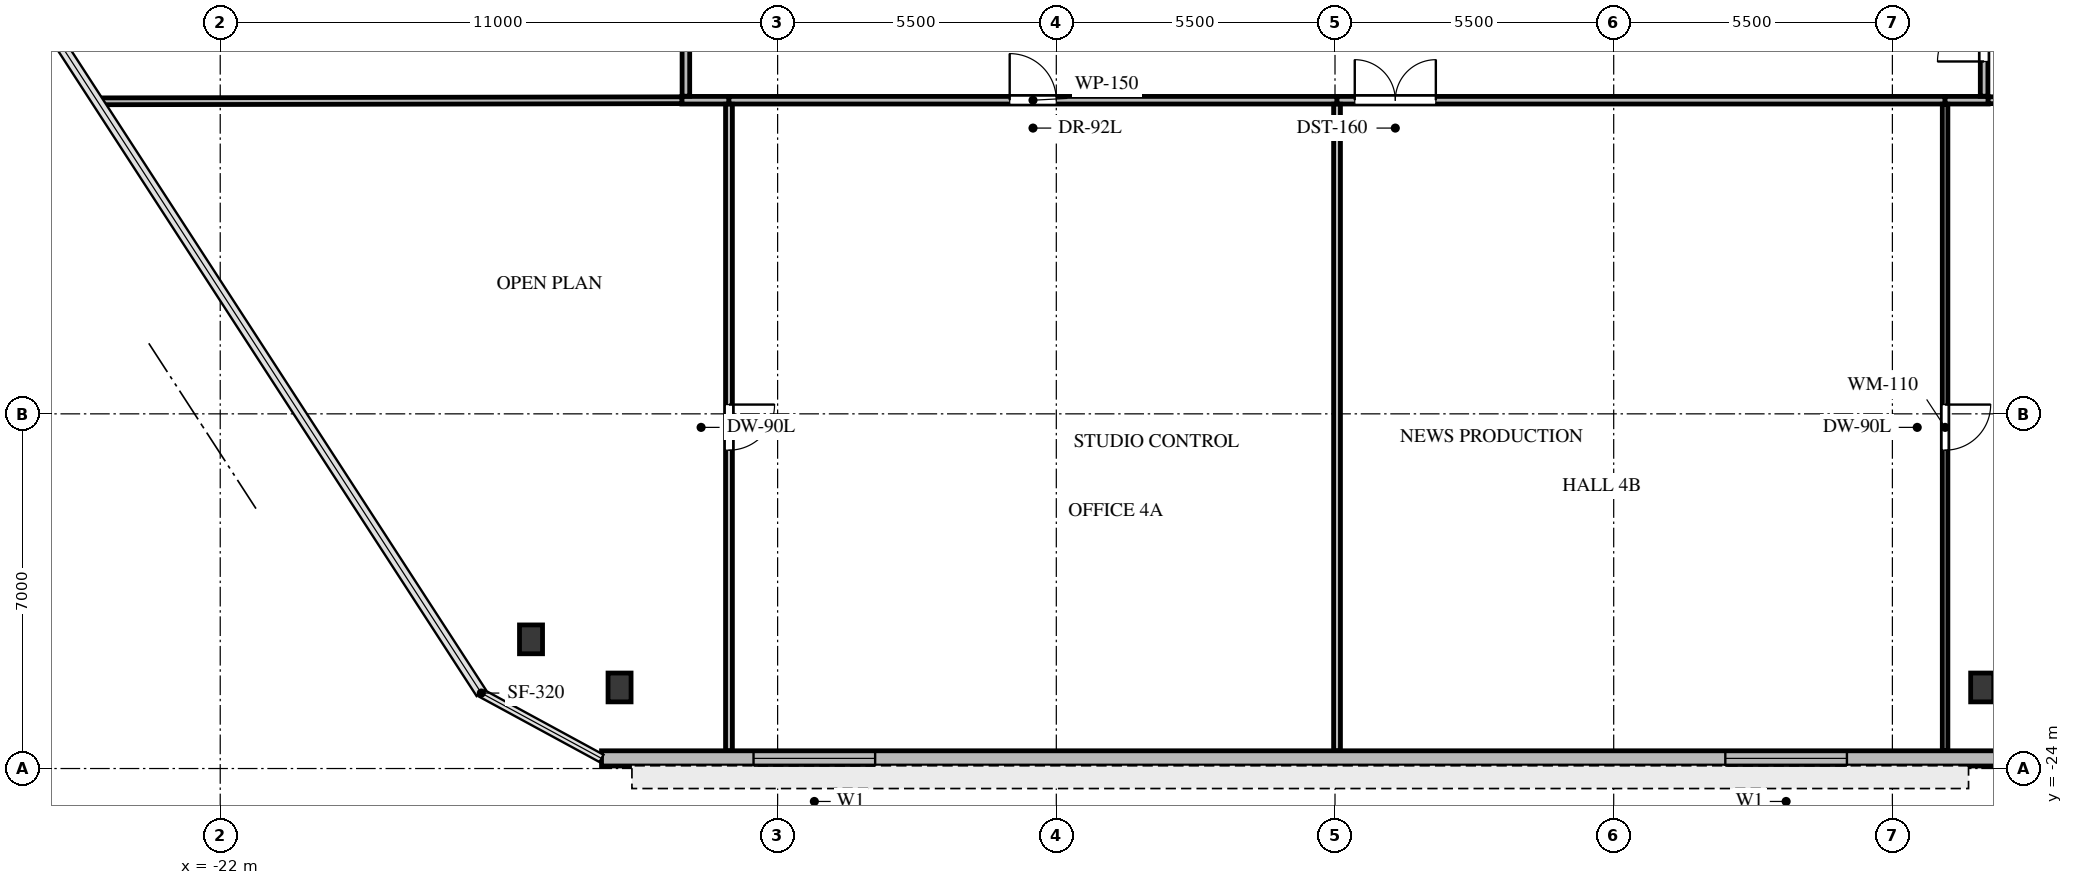
"""IFC4 building model, lengths in metres.
Left out: names, types, materials, properties, quantities, classifications, styles, units other than length and angle.
Written with IfcOpenShell. Run it as: python <this file> out.ifc"""

import sys

from ifc_helpers import new_model, si_unit, direction, frame, frame_2d, origin, origin_2d, place, context, subcontext, project, spatial, rectangle, i_section, extrude, source, transform, mapped, element, fill, save


model = new_model("IFC4")
c1 = context("Model", 3, precision=1e-05, world=origin(), true_north=direction((0.0, 1.0)))
c2 = subcontext(c1, "Body", "Model", "MODEL_VIEW")
j1 = project(units=[si_unit("LENGTHUNIT", "METRE"), si_unit("PLANEANGLEUNIT", "RADIAN")], contexts=[c1])
p1 = place(None, origin())
s1 = spatial("IfcSite", under=j1, at=p1, CompositionType="ELEMENT")
p2 = place(p1, origin())
s2 = spatial("IfcBuilding", under=s1, at=p2, CompositionType="ELEMENT")
p3 = place(p2, frame((0.0, 0.0, 21.2)))
s3 = spatial("IfcBuildingStorey", under=s2, at=p3, CompositionType="ELEMENT", Elevation=21.2)
m1 = source(origin(), c2, "Body", "SweptSolid", [
    extrude(i_section(OverallWidth=0.454, OverallDepth=0.569, WebThickness=0.078, FlangeThickness=0.125, FilletRadius=0.031, at=origin_2d()), origin(), (0.0, 0.0, 1.0), 5.6),
])
for number, where, z_axis, x_axis in (
    (1, (-15.866, -21.451, -0.32), (0.0, 0.0, 1.0), (1.0, 0.0, 0.0)),
    (2, (12.772, -22.4, -0.32), (0.0, 0.0, 1.0), (1.0, 0.0, 0.0)),
    (3, (-14.119, -22.4, -0.32), (0.0, 0.0, 1.0), (1.0, 0.0, 0.0)),
):
    element("IfcColumn", number, at=place(p3, frame(where, z_axis=z_axis, x_axis=x_axis)), inside=s3, PredefinedType="COLUMN", context=c2, shape_type="MappedRepresentation", body=[
        mapped(m1, transform((0.0, 0.0, 0.0), x_axis=(1.0, 0.0, 0.0), y_axis=(0.0, 1.0, 0.0), z_axis=(0.0, 0.0, 1.0), scale=1.0)),
    ])
p4 = place(p3, frame((13.103, -23.8, 0.0), z_axis=(0.0, 0.0, 1.0), x_axis=(-1.0, 0.0, 0.0)))
e4 = element("IfcWall", 4, at=p4, inside=s3, PredefinedType="SOLIDWALL", context=c2, shape_type="SweptSolid", body=[
    extrude(rectangle(XDim=27.578, YDim=0.3, at=frame_2d((13.789, 0.0))), origin(), (0.0, 0.0, 1.0), 5.28),
])
p5 = place(p4, frame((3.0, 0.0, 1.0)))
e5 = element("IfcOpeningElement", 5, at=p5, cuts=e4, PredefinedType="OPENING", context=c2, shape_type="SweptSolid", body=[
    extrude(rectangle(XDim=2.4, YDim=2.1, at=frame_2d((1.2, 1.05))), frame((0.0, 0.16, 0.0), z_axis=(0.0, -1.0, 0.0), x_axis=(1.0, 0.0, 0.0)), (0.0, 0.0, 1.0), 0.32),
])
p6 = place(p4, frame((22.178, 0.0, 1.0)))
e6 = element("IfcOpeningElement", 6, at=p6, cuts=e4, PredefinedType="OPENING", context=c2, shape_type="SweptSolid", body=[
    extrude(rectangle(XDim=2.4, YDim=2.1, at=frame_2d((1.2, 1.05))), frame((0.0, 0.16, 0.0), z_axis=(0.0, -1.0, 0.0), x_axis=(1.0, 0.0, 0.0)), (0.0, 0.0, 1.0), 0.32),
])
p7 = place(p3, frame((-12.89, -10.81, 0.0), z_axis=(0.0, 0.0, 1.0), x_axis=(1.0, 0.0, 0.0)))
e7 = element("IfcWall", 7, at=p7, inside=s3, PredefinedType="PARTITIONING", context=c2, shape_type="SweptSolid", body=[
    extrude(rectangle(XDim=0.93, YDim=0.15, at=frame_2d((0.465, 0.0))), origin(), (0.0, 0.0, 1.0), 4.285),
])
p8 = place(p3, frame((-11.96, -10.81, 0.0), z_axis=(0.0, 0.0, 1.0), x_axis=(1.0, 0.0, 0.0)))
e8 = element("IfcWall", 8, at=p8, inside=s3, PredefinedType="PARTITIONING", context=c2, shape_type="SweptSolid", body=[
    extrude(rectangle(XDim=12.0, YDim=0.15, at=frame_2d((6.0, 0.0))), origin(), (0.0, 0.0, 1.0), 4.285),
])
p9 = place(p8, frame((5.54, 0.0, 0.0)))
e9 = element("IfcOpeningElement", 9, at=p9, cuts=e8, PredefinedType="OPENING", context=c2, shape_type="SweptSolid", body=[
    extrude(rectangle(XDim=0.92, YDim=2.1, at=frame_2d((0.46, 1.05))), frame((0.0, 0.085, 0.0), z_axis=(0.0, -1.0, 0.0), x_axis=(1.0, 0.0, 0.0)), (0.0, 0.0, 1.0), 0.17),
])
p10 = place(p3, frame((0.04, -10.81, 0.0), z_axis=(0.0, 0.0, 1.0), x_axis=(1.0, 0.0, 0.0)))
e10 = element("IfcWall", 10, at=p10, inside=s3, PredefinedType="PARTITIONING", context=c2, shape_type="SweptSolid", body=[
    extrude(rectangle(XDim=12.0, YDim=0.15, at=frame_2d((6.0, 0.0))), origin(), (0.0, 0.0, 1.0), 4.285),
])
p11 = place(p10, frame((0.35, 0.0, 0.0)))
e11 = element("IfcOpeningElement", 11, at=p11, cuts=e10, PredefinedType="OPENING", context=c2, shape_type="SweptSolid", body=[
    extrude(rectangle(XDim=1.6, YDim=2.15, at=frame_2d((0.8, 1.075))), frame((0.0, 0.085, 0.0), z_axis=(0.0, -1.0, 0.0), x_axis=(1.0, 0.0, 0.0)), (0.0, 0.0, 1.0), 0.17),
])
p12 = place(p3, frame((12.04, -10.81, 0.0), z_axis=(0.0, 0.0, 1.0), x_axis=(1.0, 0.0, 0.0)))
e12 = element("IfcWall", 12, at=p12, inside=s3, PredefinedType="PARTITIONING", context=c2, shape_type="SweptSolid", body=[
    extrude(rectangle(XDim=0.85, YDim=0.15, at=frame_2d((0.425, 0.0))), origin(), (0.0, 0.0, 1.0), 5.265),
])
p13 = place(p3, frame((-12.81, -8.46, 0.0), z_axis=(0.0, 0.0, 1.0), x_axis=(0.0, -1.0, 0.0)))
e13 = element("IfcWall", 13, at=p13, inside=s3, PredefinedType="PARTITIONING", context=c2, shape_type="SweptSolid", body=[
    extrude(rectangle(XDim=2.271, YDim=0.15, at=frame_2d((1.135, 0.0))), origin(), (0.0, 0.0, 1.0), 5.265),
])
p14 = place(p3, frame((12.81, -10.731, 0.0), z_axis=(0.0, 0.0, 1.0), x_axis=(0.0, 1.0, 0.0)))
e14 = element("IfcWall", 14, at=p14, inside=s3, PredefinedType="PARTITIONING", context=c2, shape_type="SweptSolid", body=[
    extrude(rectangle(XDim=2.291, YDim=0.15, at=frame_2d((1.146, 0.0))), origin(), (0.0, 0.0, 1.0), 5.265),
])
p15 = place(p14, frame((0.686, 0.0, 0.0)))
e15 = element("IfcOpeningElement", 15, at=p15, cuts=e14, PredefinedType="OPENING", context=c2, shape_type="SweptSolid", body=[
    extrude(rectangle(XDim=0.92, YDim=2.1, at=frame_2d((0.46, 1.05))), frame((0.0, 0.085, 0.0), z_axis=(0.0, -1.0, 0.0), x_axis=(1.0, 0.0, 0.0)), (0.0, 0.0, 1.0), 0.17),
])
p16 = place(p3, frame((-11.96, -10.889, 0.0), z_axis=(0.0, 0.0, 1.0), x_axis=(0.0, -1.0, 0.0)))
e16 = element("IfcWall", 16, at=p16, inside=s3, PredefinedType="PARTITIONING", context=c2, shape_type="SweptSolid", body=[
    extrude(rectangle(XDim=12.756, YDim=0.135, at=frame_2d((6.378, 0.0))), origin(), (0.0, 0.0, 1.0), 4.285),
])
p17 = place(p16, frame((5.928, 0.0, 0.0)))
e17 = element("IfcOpeningElement", 17, at=p17, cuts=e16, PredefinedType="OPENING", context=c2, shape_type="SweptSolid", body=[
    extrude(rectangle(XDim=0.9, YDim=2.05, at=frame_2d((0.45, 1.025))), frame((0.0, 0.078, 0.0), z_axis=(0.0, -1.0, 0.0), x_axis=(1.0, 0.0, 0.0)), (0.0, 0.0, 1.0), 0.155),
])
p18 = place(p3, frame((-24.422, -10.832, 0.0), z_axis=(0.0, 0.0, 1.0), x_axis=(0.999998264499, 0.001863061508, 0.0)))
e18 = element("IfcWall", 18, at=p18, inside=s3, PredefinedType="PARTITIONING", context=c2, shape_type="SweptSolid", body=[
    extrude(rectangle(XDim=11.532, YDim=0.135, at=frame_2d((5.766, 0.0))), origin(), (0.0, 0.0, 1.0), 4.574),
])
p19 = place(p3, frame((0.04, -10.889, 0.0), z_axis=(0.0, 0.0, 1.0), x_axis=(0.0, -1.0, 0.0)))
e19 = element("IfcWall", 19, at=p19, inside=s3, PredefinedType="PARTITIONING", context=c2, shape_type="SweptSolid", body=[
    extrude(rectangle(XDim=12.756, YDim=0.135, at=frame_2d((6.378, 0.0))), origin(), (0.0, 0.0, 1.0), 4.574),
])
p20 = place(p3, frame((12.04, -10.889, 0.0), z_axis=(0.0, 0.0, 1.0), x_axis=(0.0, -1.0, 0.0)))
e20 = element("IfcWall", 20, at=p20, inside=s3, PredefinedType="MOVABLE", context=c2, shape_type="SweptSolid", body=[
    extrude(rectangle(XDim=12.756, YDim=0.11, at=frame_2d((6.378, 0.0))), origin(), (0.0, 0.0, 1.0), 4.285),
])
p21 = place(p20, frame((5.928, 0.0, 0.0)))
e21 = element("IfcOpeningElement", 21, at=p21, cuts=e20, PredefinedType="OPENING", context=c2, shape_type="SweptSolid", body=[
    extrude(rectangle(XDim=0.9, YDim=2.05, at=frame_2d((0.45, 1.025))), frame((0.0, 0.065, 0.0), z_axis=(0.0, -1.0, 0.0), x_axis=(1.0, 0.0, 0.0)), (0.0, 0.0, 1.0), 0.13),
])
p22 = place(p3, frame((12.89, -10.81, 0.0), z_axis=(0.0, 0.0, 1.0), x_axis=(0.999997852069, -0.002072645121, 0.0)))
e22 = element("IfcWall", 22, at=p22, inside=s3, PredefinedType="PARTITIONING", context=c2, shape_type="SweptSolid", body=[
    extrude(rectangle(XDim=11.426, YDim=0.135, at=frame_2d((5.713, 0.0))), origin(), (0.0, 0.0, 1.0), 4.574),
])
m2 = source(origin(), c2, "Body", "SweptSolid", [
    extrude(rectangle(XDim=2.4, YDim=2.1, at=frame_2d((1.2, 1.05))), frame((0.0, 0.03, 0.0), z_axis=(0.0, -1.0, 0.0), x_axis=(1.0, 0.0, 0.0)), (0.0, 0.0, 1.0), 0.06),
])
p23 = place(p5, origin())
e23 = element("IfcWindow", 23, at=p23, inside=s3, PartitioningType="SINGLE_PANEL", PredefinedType="WINDOW", context=c2, shape_type="MappedRepresentation", body=[
    mapped(m2, transform((0.0, 0.0, 0.0), x_axis=(1.0, 0.0, 0.0), y_axis=(0.0, 1.0, 0.0), z_axis=(0.0, 0.0, 1.0), scale=1.0)),
])
fill(e5, e23)
p24 = place(p6, origin())
e24 = element("IfcWindow", 24, at=p24, inside=s3, PartitioningType="SINGLE_PANEL", PredefinedType="WINDOW", context=c2, shape_type="MappedRepresentation", body=[
    mapped(m2, transform((0.0, 0.0, 0.0), x_axis=(1.0, 0.0, 0.0), y_axis=(0.0, 1.0, 0.0), z_axis=(0.0, 0.0, 1.0), scale=1.0)),
])
fill(e6, e24)
m3 = source(origin(), c2, "Body", "SweptSolid", [
    extrude(rectangle(XDim=0.92, YDim=2.1, at=frame_2d((0.46, 1.05))), frame((0.0, 0.025, 0.0), z_axis=(0.0, -1.0, 0.0), x_axis=(1.0, 0.0, 0.0)), (0.0, 0.0, 1.0), 0.05),
])
p25 = place(p9, origin())
e25 = element("IfcDoor", 25, at=p25, inside=s3, OperationType="SINGLE_SWING_LEFT", PredefinedType="DOOR", context=c2, shape_type="MappedRepresentation", body=[
    mapped(m3, transform((0.0, 0.0, 0.0), x_axis=(1.0, 0.0, 0.0), y_axis=(0.0, 1.0, 0.0), z_axis=(0.0, 0.0, 1.0), scale=1.0)),
])
fill(e9, e25)
m4 = source(origin(), c2, "Body", "SweptSolid", [
    extrude(rectangle(XDim=1.6, YDim=2.15, at=frame_2d((0.8, 1.075))), frame((0.0, 0.025, 0.0), z_axis=(0.0, -1.0, 0.0), x_axis=(1.0, 0.0, 0.0)), (0.0, 0.0, 1.0), 0.05),
])
p26 = place(p11, origin())
e26 = element("IfcDoor", 26, at=p26, inside=s3, OperationType="DOUBLE_DOOR_SINGLE_SWING", PredefinedType="DOOR", context=c2, shape_type="MappedRepresentation", body=[
    mapped(m4, transform((0.0, 0.0, 0.0), x_axis=(1.0, 0.0, 0.0), y_axis=(0.0, 1.0, 0.0), z_axis=(0.0, 0.0, 1.0), scale=1.0)),
])
fill(e11, e26)
p27 = place(p15, origin())
e27 = element("IfcDoor", 27, at=p27, inside=s3, OperationType="SINGLE_SWING_LEFT", PredefinedType="DOOR", context=c2, shape_type="MappedRepresentation", body=[
    mapped(m3, transform((0.0, 0.0, 0.0), x_axis=(1.0, 0.0, 0.0), y_axis=(0.0, 1.0, 0.0), z_axis=(0.0, 0.0, 1.0), scale=1.0)),
])
fill(e15, e27)
m5 = source(origin(), c2, "Body", "SweptSolid", [
    extrude(rectangle(XDim=0.9, YDim=2.05, at=frame_2d((0.45, 1.025))), frame((0.0, 0.025, 0.0), z_axis=(0.0, -1.0, 0.0), x_axis=(1.0, 0.0, 0.0)), (0.0, 0.0, 1.0), 0.05),
])
p28 = place(p17, origin())
e28 = element("IfcDoor", 28, at=p28, inside=s3, OperationType="SINGLE_SWING_LEFT", PredefinedType="DOOR", context=c2, shape_type="MappedRepresentation", body=[
    mapped(m5, transform((0.0, 0.0, 0.0), x_axis=(1.0, 0.0, 0.0), y_axis=(0.0, 1.0, 0.0), z_axis=(0.0, 0.0, 1.0), scale=1.0)),
])
fill(e17, e28)
p29 = place(p21, origin())
e29 = element("IfcDoor", 29, at=p29, inside=s3, OperationType="SINGLE_SWING_LEFT", PredefinedType="DOOR", context=c2, shape_type="MappedRepresentation", body=[
    mapped(m5, transform((0.0, 0.0, 0.0), x_axis=(1.0, 0.0, 0.0), y_axis=(0.0, 1.0, 0.0), z_axis=(0.0, 0.0, 1.0), scale=1.0)),
])
fill(e21, e29)
save(model, sys.argv[1])
